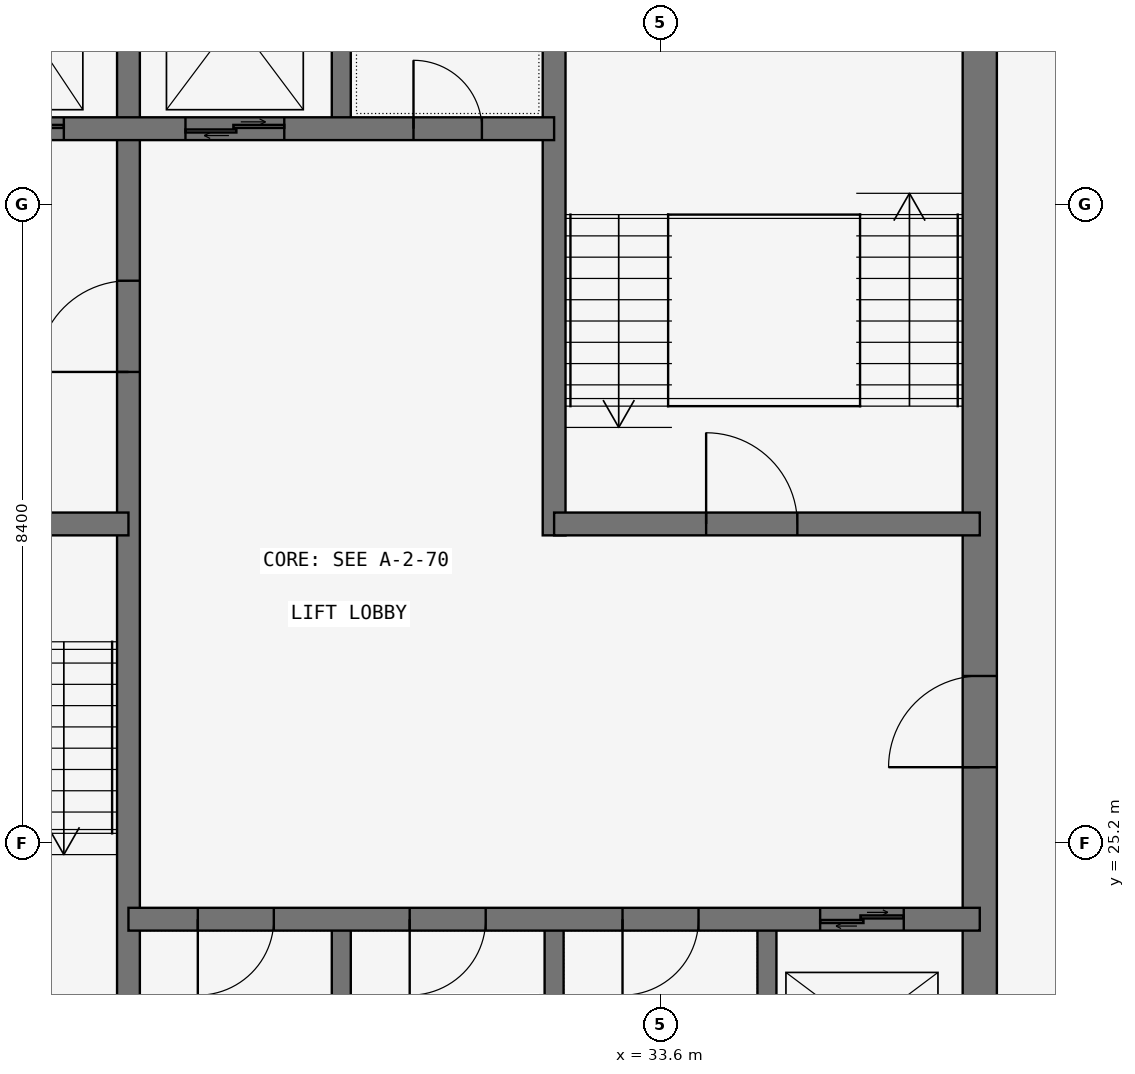
"""IFC4 building model, lengths in metres.
Left out: names, types, materials, properties, quantities, classifications, styles, units other than length and angle.
Written with IfcOpenShell. Run it as: python <this file> out.ifc"""

import sys

from ifc_helpers import new_model, si_unit, direction, frame, frame_2d, origin, place, context, subcontext, project, spatial, rectangle, extrude, element, fill, save


model = new_model("IFC4")
c1 = context("Model", 3, precision=1e-05, world=origin(), true_north=direction((0.0, 1.0)))
c2 = subcontext(c1, "Body", "Model", "MODEL_VIEW")
j1 = project(units=[si_unit("LENGTHUNIT", "METRE"), si_unit("PLANEANGLEUNIT", "RADIAN")], contexts=[c1])
p1 = place(None, origin())
s1 = spatial("IfcSite", under=j1, at=p1, CompositionType="ELEMENT")
p2 = place(p1, origin())
s2 = spatial("IfcBuilding", under=s1, at=p2, CompositionType="ELEMENT")
p3 = place(p2, frame((0.0, 0.0, 257.7)))
s3 = spatial("IfcBuildingStorey", under=s2, at=p3, CompositionType="ELEMENT", Elevation=257.7)
p4 = place(p3, frame((37.8, 21.0, 0.0), z_axis=(0.0, 0.0, 1.0), x_axis=(0.0, 1.0, 0.0)))
e1 = element("IfcWall", 1, at=p4, inside=s3, PredefinedType="SHEAR", context=c2, shape_type="SweptSolid", body=[
    extrude(rectangle(XDim=17.025, YDim=0.45, at=frame_2d((8.512, 0.0))), origin(), (0.0, 0.0, 1.0), 3.6),
])
p5 = place(p4, frame((5.2, 0.0, 0.0)))
e2 = element("IfcOpeningElement", 2, at=p5, cuts=e1, PredefinedType="OPENING", context=c2, shape_type="SweptSolid", body=[
    extrude(rectangle(XDim=1.2, YDim=2.1, at=frame_2d((0.6, 1.05))), frame((0.0, 0.235, 0.0), z_axis=(0.0, -1.0, 0.0), x_axis=(1.0, 0.0, 0.0)), (0.0, 0.0, 1.0), 0.47),
])
p6 = place(p3, frame((26.6, 21.0, 0.0), z_axis=(0.0, 0.0, 1.0), x_axis=(0.0, 1.0, 0.0)))
e3 = element("IfcWall", 3, at=p6, inside=s3, PredefinedType="SHEAR", context=c2, shape_type="SweptSolid", body=[
    extrude(rectangle(XDim=16.8, YDim=0.3, at=frame_2d((8.4, 0.0))), origin(), (0.0, 0.0, 1.0), 3.6),
])
p7 = place(p6, frame((10.4, 0.0, 0.0)))
e4 = element("IfcOpeningElement", 4, at=p7, cuts=e3, PredefinedType="OPENING", context=c2, shape_type="SweptSolid", body=[
    extrude(rectangle(XDim=1.2, YDim=2.1, at=frame_2d((0.6, 1.05))), frame((0.0, 0.16, 0.0), z_axis=(0.0, -1.0, 0.0), x_axis=(1.0, 0.0, 0.0)), (0.0, 0.0, 1.0), 0.32),
])
p8 = place(p3, frame((21.0, 29.4, 0.0), z_axis=(0.0, 0.0, 1.0), x_axis=(1.0, 0.0, 0.0)))
e5 = element("IfcWall", 5, at=p8, inside=s3, PredefinedType="SHEAR", context=c2, shape_type="SweptSolid", body=[
    extrude(rectangle(XDim=5.6, YDim=0.3, at=frame_2d((2.8, 0.0))), origin(), (0.0, 0.0, 1.0), 3.6),
])
p9 = place(p8, frame((2.3, 0.0, 0.0)))
e6 = element("IfcOpeningElement", 6, at=p9, cuts=e5, PredefinedType="OPENING", context=c2, shape_type="SweptSolid", body=[
    extrude(rectangle(XDim=1.2, YDim=2.1, at=frame_2d((0.6, 1.05))), frame((0.0, 0.16, 0.0), z_axis=(0.0, -1.0, 0.0), x_axis=(1.0, 0.0, 0.0)), (0.0, 0.0, 1.0), 0.32),
])
p10 = place(p3, frame((21.0, 34.6, 0.0), z_axis=(0.0, 0.0, 1.0), x_axis=(1.0, 0.0, 0.0)))
e7 = element("IfcWall", 7, at=p10, inside=s3, PredefinedType="SHEAR", context=c2, shape_type="SweptSolid", body=[
    extrude(rectangle(XDim=11.2, YDim=0.3, at=frame_2d((5.6, 0.0))), origin(), (0.0, 0.0, 1.0), 3.6),
])
p11 = place(p10, frame((9.35, 0.0, 0.0)))
e8 = element("IfcOpeningElement", 8, at=p11, cuts=e7, PredefinedType="OPENING", context=c2, shape_type="SweptSolid", body=[
    extrude(rectangle(XDim=0.9, YDim=2.1, at=frame_2d((0.45, 1.05))), frame((0.0, 0.16, 0.0), z_axis=(0.0, -1.0, 0.0), x_axis=(1.0, 0.0, 0.0)), (0.0, 0.0, 1.0), 0.32),
])
p12 = place(p10, frame((1.0, 0.0, 0.0)))
e9 = element("IfcOpeningElement", 9, at=p12, cuts=e7, PredefinedType="OPENING", context=c2, shape_type="SweptSolid", body=[
    extrude(rectangle(XDim=1.1, YDim=2.1, at=frame_2d((0.55, 1.05))), frame((0.0, 0.16, 0.0), z_axis=(0.0, -1.0, 0.0), x_axis=(1.0, 0.0, 0.0)), (0.0, 0.0, 1.0), 0.32),
])
p13 = place(p10, frame((3.65, 0.0, 0.0)))
e10 = element("IfcOpeningElement", 10, at=p13, cuts=e7, PredefinedType="OPENING", context=c2, shape_type="SweptSolid", body=[
    extrude(rectangle(XDim=1.1, YDim=2.1, at=frame_2d((0.55, 1.05))), frame((0.0, 0.16, 0.0), z_axis=(0.0, -1.0, 0.0), x_axis=(1.0, 0.0, 0.0)), (0.0, 0.0, 1.0), 0.32),
])
p14 = place(p10, frame((6.35, 0.0, 0.0)))
e11 = element("IfcOpeningElement", 11, at=p14, cuts=e7, PredefinedType="OPENING", context=c2, shape_type="SweptSolid", body=[
    extrude(rectangle(XDim=1.3, YDim=2.1, at=frame_2d((0.65, 1.05))), frame((0.0, 0.16, 0.0), z_axis=(0.0, -1.0, 0.0), x_axis=(1.0, 0.0, 0.0)), (0.0, 0.0, 1.0), 0.32),
])
p15 = place(p3, frame((26.6, 24.2, 0.0), z_axis=(0.0, 0.0, 1.0), x_axis=(1.0, 0.0, 0.0)))
e12 = element("IfcWall", 12, at=p15, inside=s3, PredefinedType="SHEAR", context=c2, shape_type="SweptSolid", body=[
    extrude(rectangle(XDim=11.2, YDim=0.3, at=frame_2d((5.6, 0.0))), origin(), (0.0, 0.0, 1.0), 3.6),
])
p16 = place(p15, frame((0.913, 0.0, 0.0)))
e13 = element("IfcOpeningElement", 13, at=p16, cuts=e12, PredefinedType="OPENING", context=c2, shape_type="SweptSolid", body=[
    extrude(rectangle(XDim=1.0, YDim=2.1, at=frame_2d((0.5, 1.05))), frame((0.0, 0.16, 0.0), z_axis=(0.0, -1.0, 0.0), x_axis=(1.0, 0.0, 0.0)), (0.0, 0.0, 1.0), 0.32),
])
p17 = place(p15, frame((3.7, 0.0, 0.0)))
e14 = element("IfcOpeningElement", 14, at=p17, cuts=e12, PredefinedType="OPENING", context=c2, shape_type="SweptSolid", body=[
    extrude(rectangle(XDim=1.0, YDim=2.1, at=frame_2d((0.5, 1.05))), frame((0.0, 0.16, 0.0), z_axis=(0.0, -1.0, 0.0), x_axis=(1.0, 0.0, 0.0)), (0.0, 0.0, 1.0), 0.32),
])
p18 = place(p15, frame((6.5, 0.0, 0.0)))
e15 = element("IfcOpeningElement", 15, at=p18, cuts=e12, PredefinedType="OPENING", context=c2, shape_type="SweptSolid", body=[
    extrude(rectangle(XDim=1.0, YDim=2.1, at=frame_2d((0.5, 1.05))), frame((0.0, 0.16, 0.0), z_axis=(0.0, -1.0, 0.0), x_axis=(1.0, 0.0, 0.0)), (0.0, 0.0, 1.0), 0.32),
])
p19 = place(p15, frame((9.1, 0.0, 0.0)))
e16 = element("IfcOpeningElement", 16, at=p19, cuts=e12, PredefinedType="OPENING", context=c2, shape_type="SweptSolid", body=[
    extrude(rectangle(XDim=1.1, YDim=2.1, at=frame_2d((0.55, 1.05))), frame((0.0, 0.16, 0.0), z_axis=(0.0, -1.0, 0.0), x_axis=(1.0, 0.0, 0.0)), (0.0, 0.0, 1.0), 0.32),
])
p20 = place(p3, frame((32.2, 29.25, 0.0), z_axis=(0.0, 0.0, 1.0), x_axis=(0.0, 1.0, 0.0)))
e17 = element("IfcWall", 17, at=p20, inside=s3, PredefinedType="SHEAR", context=c2, shape_type="SweptSolid", body=[
    extrude(rectangle(XDim=8.55, YDim=0.3, at=frame_2d((4.275, 0.0))), origin(), (0.0, 0.0, 1.0), 3.6),
])
p21 = place(p3, frame((32.2, 29.4, 0.0), z_axis=(0.0, 0.0, 1.0), x_axis=(1.0, 0.0, 0.0)))
e18 = element("IfcWall", 18, at=p21, inside=s3, PredefinedType="SHEAR", context=c2, shape_type="SweptSolid", body=[
    extrude(rectangle(XDim=5.6, YDim=0.3, at=frame_2d((2.8, 0.0))), origin(), (0.0, 0.0, 1.0), 3.6),
])
p22 = place(p21, frame((2.0, 0.0, 0.0)))
e19 = element("IfcOpeningElement", 19, at=p22, cuts=e18, PredefinedType="OPENING", context=c2, shape_type="SweptSolid", body=[
    extrude(rectangle(XDim=1.2, YDim=2.1, at=frame_2d((0.6, 1.05))), frame((0.0, 0.16, 0.0), z_axis=(0.0, -1.0, 0.0), x_axis=(1.0, 0.0, 0.0)), (0.0, 0.0, 1.0), 0.32),
])
for number, where, z_axis, x_axis in (
    (20, (29.4, 21.0, 0.0), (0.0, 0.0, 1.0), (0.0, 1.0, 0.0)),
    (21, (32.2, 21.0, 0.0), (0.0, 0.0, 1.0), (0.0, 1.0, 0.0)),
    (22, (35.0, 21.0, 0.0), (0.0, 0.0, 1.0), (0.0, 1.0, 0.0)),
    (23, (29.4, 34.6, 0.0), (0.0, 0.0, 1.0), (0.0, 1.0, 0.0)),
):
    element("IfcWall", number, at=place(p3, frame(where, z_axis=z_axis, x_axis=x_axis)), inside=s3, PredefinedType="SHEAR", context=c2, shape_type="SweptSolid", body=[
        extrude(rectangle(XDim=3.2, YDim=0.25, at=frame_2d((1.6, 0.0))), origin(), (0.0, 0.0, 1.0), 3.6),
    ])
p23 = place(p7, origin())
e24 = element("IfcDoor", 24, at=p23, inside=s3, OperationType="SINGLE_SWING_LEFT", PredefinedType="DOOR", context=c2, shape_type="SweptSolid", body=[
    extrude(rectangle(XDim=1.2, YDim=2.1, at=frame_2d((0.6, 1.05))), frame((0.0, 0.025, 0.0), z_axis=(0.0, -1.0, 0.0), x_axis=(1.0, 0.0, 0.0)), (0.0, 0.0, 1.0), 0.05),
])
fill(e4, e24)
p24 = place(p5, origin())
e25 = element("IfcDoor", 25, at=p24, inside=s3, OperationType="SINGLE_SWING_LEFT", PredefinedType="DOOR", context=c2, shape_type="SweptSolid", body=[
    extrude(rectangle(XDim=1.2, YDim=2.1, at=frame_2d((0.6, 1.05))), frame((0.0, 0.025, 0.0), z_axis=(0.0, -1.0, 0.0), x_axis=(1.0, 0.0, 0.0)), (0.0, 0.0, 1.0), 0.05),
])
fill(e2, e25)
p25 = place(p22, origin())
e26 = element("IfcDoor", 26, at=p25, inside=s3, OperationType="SINGLE_SWING_LEFT", PredefinedType="DOOR", context=c2, shape_type="SweptSolid", body=[
    extrude(rectangle(XDim=1.2, YDim=2.1, at=frame_2d((0.6, 1.05))), frame((0.0, 0.025, 0.0), z_axis=(0.0, -1.0, 0.0), x_axis=(1.0, 0.0, 0.0)), (0.0, 0.0, 1.0), 0.05),
])
fill(e19, e26)
p26 = place(p11, origin())
e27 = element("IfcDoor", 27, at=p26, inside=s3, OperationType="SINGLE_SWING_LEFT", PredefinedType="DOOR", context=c2, shape_type="SweptSolid", body=[
    extrude(rectangle(XDim=0.9, YDim=2.1, at=frame_2d((0.45, 1.05))), frame((0.0, 0.025, 0.0), z_axis=(0.0, -1.0, 0.0), x_axis=(1.0, 0.0, 0.0)), (0.0, 0.0, 1.0), 0.05),
])
fill(e8, e27)
p27 = place(p16, frame((1.0, 0.0, 0.0), z_axis=(0.0, 0.0, 1.0), x_axis=(-1.0, 0.0, 0.0)))
e28 = element("IfcDoor", 28, at=p27, inside=s3, OperationType="SINGLE_SWING_RIGHT", PredefinedType="DOOR", context=c2, shape_type="SweptSolid", body=[
    extrude(rectangle(XDim=1.0, YDim=2.1, at=frame_2d((0.5, 1.05))), frame((0.0, 0.025, 0.0), z_axis=(0.0, -1.0, 0.0), x_axis=(1.0, 0.0, 0.0)), (0.0, 0.0, 1.0), 0.05),
])
fill(e13, e28)
p28 = place(p17, frame((1.0, 0.0, 0.0), z_axis=(0.0, 0.0, 1.0), x_axis=(-1.0, 0.0, 0.0)))
e29 = element("IfcDoor", 29, at=p28, inside=s3, OperationType="SINGLE_SWING_RIGHT", PredefinedType="DOOR", context=c2, shape_type="SweptSolid", body=[
    extrude(rectangle(XDim=1.0, YDim=2.1, at=frame_2d((0.5, 1.05))), frame((0.0, 0.025, 0.0), z_axis=(0.0, -1.0, 0.0), x_axis=(1.0, 0.0, 0.0)), (0.0, 0.0, 1.0), 0.05),
])
fill(e14, e29)
p29 = place(p18, frame((1.0, 0.0, 0.0), z_axis=(0.0, 0.0, 1.0), x_axis=(-1.0, 0.0, 0.0)))
e30 = element("IfcDoor", 30, at=p29, inside=s3, OperationType="SINGLE_SWING_RIGHT", PredefinedType="DOOR", context=c2, shape_type="SweptSolid", body=[
    extrude(rectangle(XDim=1.0, YDim=2.1, at=frame_2d((0.5, 1.05))), frame((0.0, 0.025, 0.0), z_axis=(0.0, -1.0, 0.0), x_axis=(1.0, 0.0, 0.0)), (0.0, 0.0, 1.0), 0.05),
])
fill(e15, e30)
p30 = place(p19, origin())
e31 = element("IfcDoor", 31, at=p30, inside=s3, OperationType="DOUBLE_DOOR_SLIDING", PredefinedType="DOOR", context=c2, shape_type="SweptSolid", body=[
    extrude(rectangle(XDim=1.1, YDim=2.1, at=frame_2d((0.55, 1.05))), frame((0.0, 0.025, 0.0), z_axis=(0.0, -1.0, 0.0), x_axis=(1.0, 0.0, 0.0)), (0.0, 0.0, 1.0), 0.05),
])
fill(e16, e31)
p31 = place(p13, origin())
e32 = element("IfcDoor", 32, at=p31, inside=s3, OperationType="DOUBLE_DOOR_SLIDING", PredefinedType="DOOR", context=c2, shape_type="SweptSolid", body=[
    extrude(rectangle(XDim=1.1, YDim=2.1, at=frame_2d((0.55, 1.05))), frame((0.0, 0.025, 0.0), z_axis=(0.0, -1.0, 0.0), x_axis=(1.0, 0.0, 0.0)), (0.0, 0.0, 1.0), 0.05),
])
fill(e10, e32)
p32 = place(p14, origin())
e33 = element("IfcDoor", 33, at=p32, inside=s3, OperationType="DOUBLE_DOOR_SLIDING", PredefinedType="DOOR", context=c2, shape_type="SweptSolid", body=[
    extrude(rectangle(XDim=1.3, YDim=2.1, at=frame_2d((0.65, 1.05))), frame((0.0, 0.025, 0.0), z_axis=(0.0, -1.0, 0.0), x_axis=(1.0, 0.0, 0.0)), (0.0, 0.0, 1.0), 0.05),
])
fill(e11, e33)
save(model, sys.argv[1])
